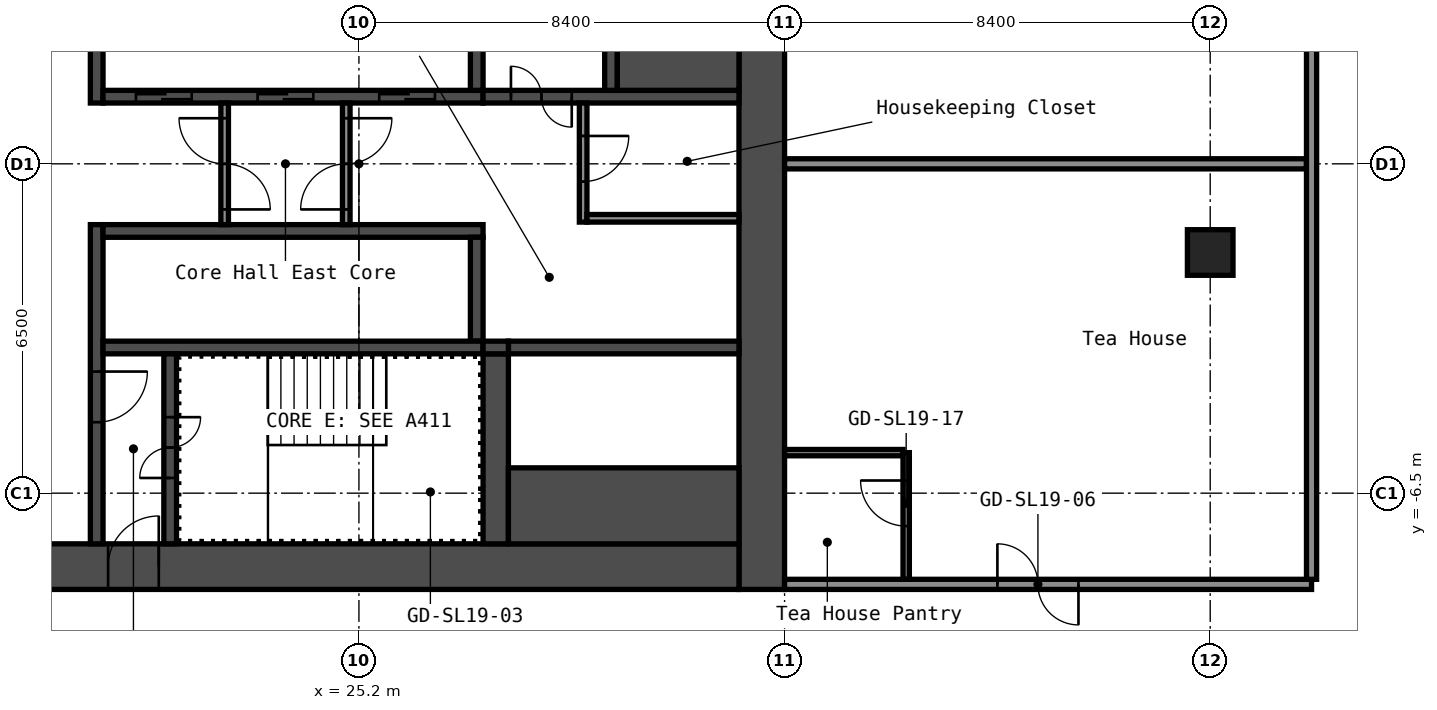
"""IFC4 building model, lengths in metres.
Left out: names, types, materials, properties, quantities, classifications, styles, units other than length and angle.
Written with IfcOpenShell. Run it as: python <this file> out.ifc"""

import sys

from ifc_helpers import new_model, si_unit, direction, frame, frame_2d, origin, origin_2d, place, context, subcontext, project, spatial, rectangle, hollow_rectangle, extrude, element, fill, save


model = new_model("IFC4")
c1 = context("Model", 3, precision=1e-05, world=origin(), true_north=direction((0.0, 1.0)))
c2 = subcontext(c1, "Body", "Model", "MODEL_VIEW")
j1 = project(units=[si_unit("LENGTHUNIT", "METRE"), si_unit("PLANEANGLEUNIT", "RADIAN")], contexts=[c1])
p1 = place(None, origin())
s1 = spatial("IfcSite", under=j1, at=p1, CompositionType="ELEMENT")
p2 = place(p1, origin())
s2 = spatial("IfcBuilding", under=s1, at=p2, CompositionType="ELEMENT")
p3 = place(p2, frame((0.0, 0.0, 69.0)))
s3 = spatial("IfcBuildingStorey", under=s2, at=p3, CompositionType="ELEMENT", Elevation=69.0)
p4 = place(p3, frame((42.0, -1.75, 0.0), z_axis=(0.0, 0.0, 1.0), x_axis=(1.0, 0.0, 0.0)))
e1 = element("IfcColumn", 1, at=p4, inside=s3, PredefinedType="COLUMN", context=c2, shape_type="SweptSolid", body=[
    extrude(hollow_rectangle(XDim=0.9, YDim=0.9, WallThickness=0.036, at=origin_2d()), origin(), (0.0, 0.0, 1.0), 6.0),
])
p5 = place(p3, frame((33.15, -8.4, 0.0), z_axis=(0.0, 0.0, 1.0), x_axis=(0.0, 1.0, 0.0)))
e2 = element("IfcWall", 2, at=p5, inside=s3, PredefinedType="SHEAR", context=c2, shape_type="SweptSolid", body=[
    extrude(rectangle(XDim=16.8, YDim=0.9, at=frame_2d((8.4, 0.0))), origin(), (0.0, 0.0, 1.0), 6.0),
])
p6 = place(p3, frame((17.7, -7.95, 0.0), z_axis=(0.0, 0.0, 1.0), x_axis=(1.0, 0.0, 0.0)))
e3 = element("IfcWall", 3, at=p6, inside=s3, PredefinedType="SHEAR", context=c2, shape_type="SweptSolid", body=[
    extrude(rectangle(XDim=15.0, YDim=0.9, at=frame_2d((7.5, 0.0))), origin(), (0.0, 0.0, 1.0), 6.0),
])
p7 = place(p6, frame((2.55, 0.0, 0.0)))
e4 = element("IfcOpeningElement", 4, at=p7, cuts=e3, PredefinedType="OPENING", context=c2, shape_type="SweptSolid", body=[
    extrude(rectangle(XDim=1.0, YDim=2.1, at=frame_2d((0.5, 1.05))), frame((0.0, 0.46, 0.0), z_axis=(0.0, -1.0, 0.0), x_axis=(1.0, 0.0, 0.0)), (0.0, 0.0, 1.0), 0.92),
])
p8 = place(p3, frame((20.025, 1.2, 0.0), z_axis=(0.0, 0.0, 1.0), x_axis=(0.0, 1.0, 0.0)))
e5 = element("IfcWall", 5, at=p8, inside=s3, PredefinedType="SHEAR", context=c2, shape_type="SweptSolid", body=[
    extrude(rectangle(XDim=6.3, YDim=0.25, at=frame_2d((3.15, 0.0))), origin(), (0.0, 0.0, 1.0), 6.0),
])
p9 = place(p3, frame((20.025, -7.5, 0.0), z_axis=(0.0, 0.0, 1.0), x_axis=(0.0, 1.0, 0.0)))
e6 = element("IfcWall", 6, at=p9, inside=s3, PredefinedType="SHEAR", context=c2, shape_type="SweptSolid", body=[
    extrude(rectangle(XDim=6.3, YDim=0.25, at=frame_2d((3.15, 0.0))), origin(), (0.0, 0.0, 1.0), 6.0),
])
p10 = place(p9, frame((2.4, 0.0, 0.0)))
e7 = element("IfcOpeningElement", 7, at=p10, cuts=e6, PredefinedType="OPENING", context=c2, shape_type="SweptSolid", body=[
    extrude(rectangle(XDim=1.0, YDim=2.1, at=frame_2d((0.5, 1.05))), frame((0.0, 0.135, 0.0), z_axis=(0.0, -1.0, 0.0), x_axis=(1.0, 0.0, 0.0)), (0.0, 0.0, 1.0), 0.27),
])
p11 = place(p3, frame((20.15, 1.325, 0.0), z_axis=(0.0, 0.0, 1.0), x_axis=(1.0, 0.0, 0.0)))
e8 = element("IfcWall", 8, at=p11, inside=s3, PredefinedType="SHEAR", context=c2, shape_type="SweptSolid", body=[
    extrude(rectangle(XDim=7.5, YDim=0.25, at=frame_2d((3.75, 0.0))), origin(), (0.0, 0.0, 1.0), 6.0),
])
p12 = place(p11, frame((0.65, 0.0, 0.0)))
e9 = element("IfcOpeningElement", 9, at=p12, cuts=e8, PredefinedType="OPENING", context=c2, shape_type="SweptSolid", body=[
    extrude(rectangle(XDim=1.1, YDim=2.1, at=frame_2d((0.55, 1.05))), frame((0.0, 0.135, 0.0), z_axis=(0.0, -1.0, 0.0), x_axis=(1.0, 0.0, 0.0)), (0.0, 0.0, 1.0), 0.27),
])
p13 = place(p11, frame((3.05, 0.0, 0.0)))
e10 = element("IfcOpeningElement", 10, at=p13, cuts=e8, PredefinedType="OPENING", context=c2, shape_type="SweptSolid", body=[
    extrude(rectangle(XDim=1.1, YDim=2.1, at=frame_2d((0.55, 1.05))), frame((0.0, 0.135, 0.0), z_axis=(0.0, -1.0, 0.0), x_axis=(1.0, 0.0, 0.0)), (0.0, 0.0, 1.0), 0.27),
])
p14 = place(p11, frame((5.45, 0.0, 0.0)))
e11 = element("IfcOpeningElement", 11, at=p14, cuts=e8, PredefinedType="OPENING", context=c2, shape_type="SweptSolid", body=[
    extrude(rectangle(XDim=1.1, YDim=2.1, at=frame_2d((0.55, 1.05))), frame((0.0, 0.135, 0.0), z_axis=(0.0, -1.0, 0.0), x_axis=(1.0, 0.0, 0.0)), (0.0, 0.0, 1.0), 0.27),
])
p15 = place(p3, frame((27.525, 1.45, 0.0), z_axis=(0.0, 0.0, 1.0), x_axis=(0.0, 1.0, 0.0)))
e12 = element("IfcWall", 12, at=p15, inside=s3, PredefinedType="SHEAR", context=c2, shape_type="SweptSolid", body=[
    extrude(rectangle(XDim=2.05, YDim=0.25, at=frame_2d((1.025, 0.0))), origin(), (0.0, 0.0, 1.0), 6.0),
])
p16 = place(p3, frame((27.65, 1.325, 0.0), z_axis=(0.0, 0.0, 1.0), x_axis=(1.0, 0.0, 0.0)))
e13 = element("IfcWall", 13, at=p16, inside=s3, PredefinedType="SHEAR", context=c2, shape_type="SweptSolid", body=[
    extrude(rectangle(XDim=5.05, YDim=0.25, at=frame_2d((2.525, 0.0))), origin(), (0.0, 0.0, 1.0), 6.0),
])
p17 = place(p16, frame((0.55, 0.0, 0.0)))
e14 = element("IfcOpeningElement", 14, at=p17, cuts=e13, PredefinedType="OPENING", context=c2, shape_type="SweptSolid", body=[
    extrude(rectangle(XDim=1.2, YDim=2.1, at=frame_2d((0.6, 1.05))), frame((0.0, 0.135, 0.0), z_axis=(0.0, -1.0, 0.0), x_axis=(1.0, 0.0, 0.0)), (0.0, 0.0, 1.0), 0.27),
])
p18 = place(p3, frame((30.175, 1.45, 0.0), z_axis=(0.0, 0.0, 1.0), x_axis=(0.0, 1.0, 0.0)))
e15 = element("IfcWall", 15, at=p18, inside=s3, PredefinedType="SHEAR", context=c2, shape_type="SweptSolid", body=[
    extrude(rectangle(XDim=6.05, YDim=0.25, at=frame_2d((3.025, 0.0))), origin(), (0.0, 0.0, 1.0), 6.0),
])
p19 = place(p18, frame((2.625, 0.0, 0.0)))
e16 = element("IfcOpeningElement", 16, at=p19, cuts=e15, PredefinedType="OPENING", context=c2, shape_type="SweptSolid", body=[
    extrude(rectangle(XDim=1.1, YDim=2.1, at=frame_2d((0.55, 1.05))), frame((0.0, 0.135, 0.0), z_axis=(0.0, -1.0, 0.0), x_axis=(1.0, 0.0, 0.0)), (0.0, 0.0, 1.0), 0.27),
])
p20 = place(p3, frame((30.3, 2.375, 0.0), z_axis=(0.0, 0.0, 1.0), x_axis=(1.0, 0.0, 0.0)))
e17 = element("IfcWall", 17, at=p20, inside=s3, PredefinedType="SHEAR", context=c2, shape_type="SweptSolid", body=[
    extrude(rectangle(XDim=2.4, YDim=1.85, at=frame_2d((1.2, 0.0))), origin(), (0.0, 0.0, 1.0), 6.0),
])
p21 = place(p3, frame((20.15, -1.325, 0.0), z_axis=(0.0, 0.0, 1.0), x_axis=(1.0, 0.0, 0.0)))
e18 = element("IfcWall", 18, at=p21, inside=s3, PredefinedType="SHEAR", context=c2, shape_type="SweptSolid", body=[
    extrude(rectangle(XDim=7.5, YDim=0.25, at=frame_2d((3.75, 0.0))), origin(), (0.0, 0.0, 1.0), 6.0),
])
p22 = place(p3, frame((27.525, -3.5, 0.0), z_axis=(0.0, 0.0, 1.0), x_axis=(0.0, 1.0, 0.0)))
e19 = element("IfcWall", 19, at=p22, inside=s3, PredefinedType="SHEAR", context=c2, shape_type="SweptSolid", body=[
    extrude(rectangle(XDim=2.05, YDim=0.25, at=frame_2d((1.025, 0.0))), origin(), (0.0, 0.0, 1.0), 6.0),
])
p23 = place(p3, frame((20.15, -3.625, 0.0), z_axis=(0.0, 0.0, 1.0), x_axis=(1.0, 0.0, 0.0)))
e20 = element("IfcWall", 20, at=p23, inside=s3, PredefinedType="SHEAR", context=c2, shape_type="SweptSolid", body=[
    extrude(rectangle(XDim=7.5, YDim=0.25, at=frame_2d((3.75, 0.0))), origin(), (0.0, 0.0, 1.0), 6.0),
])
p24 = place(p3, frame((21.475, -7.5, 0.0), z_axis=(0.0, 0.0, 1.0), x_axis=(0.0, 1.0, 0.0)))
e21 = element("IfcWall", 21, at=p24, inside=s3, PredefinedType="SHEAR", context=c2, shape_type="SweptSolid", body=[
    extrude(rectangle(XDim=3.75, YDim=0.25, at=frame_2d((1.875, 0.0))), origin(), (0.0, 0.0, 1.0), 6.0),
])
p25 = place(p24, frame((1.3, 0.0, 0.0)))
e22 = element("IfcOpeningElement", 22, at=p25, cuts=e21, PredefinedType="OPENING", context=c2, shape_type="SweptSolid", body=[
    extrude(rectangle(XDim=1.2, YDim=2.1, at=frame_2d((0.6, 1.05))), frame((0.0, 0.135, 0.0), z_axis=(0.0, -1.0, 0.0), x_axis=(1.0, 0.0, 0.0)), (0.0, 0.0, 1.0), 0.27),
])
p26 = place(p3, frame((27.9, -7.5, 0.0), z_axis=(0.0, 0.0, 1.0), x_axis=(0.0, 1.0, 0.0)))
e23 = element("IfcWall", 23, at=p26, inside=s3, PredefinedType="SHEAR", context=c2, shape_type="SweptSolid", body=[
    extrude(rectangle(XDim=3.75, YDim=0.5, at=frame_2d((1.875, 0.0))), origin(), (0.0, 0.0, 1.0), 6.0),
])
p27 = place(p3, frame((28.15, -3.625, 0.0), z_axis=(0.0, 0.0, 1.0), x_axis=(1.0, 0.0, 0.0)))
e24 = element("IfcWall", 24, at=p27, inside=s3, PredefinedType="SHEAR", context=c2, shape_type="SweptSolid", body=[
    extrude(rectangle(XDim=4.55, YDim=0.25, at=frame_2d((2.275, 0.0))), origin(), (0.0, 0.0, 1.0), 6.0),
])
p28 = place(p3, frame((28.15, -6.75, 0.0), z_axis=(0.0, 0.0, 1.0), x_axis=(1.0, 0.0, 0.0)))
e25 = element("IfcWall", 25, at=p28, inside=s3, PredefinedType="SHEAR", context=c2, shape_type="SweptSolid", body=[
    extrude(rectangle(XDim=4.55, YDim=1.5, at=frame_2d((2.275, 0.0))), origin(), (0.0, 0.0, 1.0), 6.0),
])
p29 = place(p3, frame((27.65, -3.625, 0.0), z_axis=(0.0, 0.0, 1.0), x_axis=(1.0, 0.0, 0.0)))
e26 = element("IfcWall", 26, at=p29, inside=s3, PredefinedType="SHEAR", context=c2, shape_type="SweptSolid", body=[
    extrude(rectangle(XDim=0.5, YDim=0.25, at=frame_2d((0.25, 0.0))), origin(), (0.0, 0.0, 1.0), 6.0),
])
p30 = place(p3, frame((22.55, -1.2, 0.0), z_axis=(0.0, 0.0, 1.0), x_axis=(0.0, 1.0, 0.0)))
e27 = element("IfcWall", 27, at=p30, inside=s3, PredefinedType="PARTITIONING", context=c2, shape_type="SweptSolid", body=[
    extrude(rectangle(XDim=2.4, YDim=0.15, at=frame_2d((1.2, 0.0))), origin(), (0.0, 0.0, 1.0), 6.0),
])
p31 = place(p30, frame((0.3, 0.0, 0.0)))
e28 = element("IfcOpeningElement", 28, at=p31, cuts=e27, PredefinedType="OPENING", context=c2, shape_type="SweptSolid", body=[
    extrude(rectangle(XDim=1.8, YDim=2.1, at=frame_2d((0.9, 1.05))), frame((0.0, 0.085, 0.0), z_axis=(0.0, -1.0, 0.0), x_axis=(1.0, 0.0, 0.0)), (0.0, 0.0, 1.0), 0.17),
])
p32 = place(p3, frame((24.95, -1.2, 0.0), z_axis=(0.0, 0.0, 1.0), x_axis=(0.0, 1.0, 0.0)))
e29 = element("IfcWall", 29, at=p32, inside=s3, PredefinedType="PARTITIONING", context=c2, shape_type="SweptSolid", body=[
    extrude(rectangle(XDim=2.4, YDim=0.15, at=frame_2d((1.2, 0.0))), origin(), (0.0, 0.0, 1.0), 6.0),
])
p33 = place(p32, frame((0.3, 0.0, 0.0)))
e30 = element("IfcOpeningElement", 30, at=p33, cuts=e29, PredefinedType="OPENING", context=c2, shape_type="SweptSolid", body=[
    extrude(rectangle(XDim=1.8, YDim=2.1, at=frame_2d((0.9, 1.05))), frame((0.0, 0.085, 0.0), z_axis=(0.0, -1.0, 0.0), x_axis=(1.0, 0.0, 0.0)), (0.0, 0.0, 1.0), 0.17),
])
p34 = place(p3, frame((29.625, -1.15, 0.0), z_axis=(0.0, 0.0, 1.0), x_axis=(0.0, 1.0, 0.0)))
e31 = element("IfcWall", 31, at=p34, inside=s3, PredefinedType="PARTITIONING", context=c2, shape_type="SweptSolid", body=[
    extrude(rectangle(XDim=2.35, YDim=0.15, at=frame_2d((1.175, 0.0))), origin(), (0.0, 0.0, 1.0), 6.0),
])
p35 = place(p34, frame((0.8, 0.0, 0.0)))
e32 = element("IfcOpeningElement", 32, at=p35, cuts=e31, PredefinedType="OPENING", context=c2, shape_type="SweptSolid", body=[
    extrude(rectangle(XDim=0.9, YDim=2.1, at=frame_2d((0.45, 1.05))), frame((0.0, 0.085, 0.0), z_axis=(0.0, -1.0, 0.0), x_axis=(1.0, 0.0, 0.0)), (0.0, 0.0, 1.0), 0.17),
])
p36 = place(p3, frame((29.7, -1.075, 0.0), z_axis=(0.0, 0.0, 1.0), x_axis=(1.0, 0.0, 0.0)))
e33 = element("IfcWall", 33, at=p36, inside=s3, PredefinedType="PARTITIONING", context=c2, shape_type="SweptSolid", body=[
    extrude(rectangle(XDim=3.0, YDim=0.15, at=frame_2d((1.5, 0.0))), origin(), (0.0, 0.0, 1.0), 6.0),
])
p37 = place(p3, frame((33.6, -8.3, 0.0), z_axis=(0.0, 0.0, 1.0), x_axis=(1.0, 0.0, 0.0)))
e34 = element("IfcWall", 34, at=p37, inside=s3, PredefinedType="PARTITIONING", context=c2, shape_type="SweptSolid", body=[
    extrude(rectangle(XDim=10.4, YDim=0.2, at=frame_2d((5.2, 0.0))), origin(), (0.0, 0.0, 1.0), 6.0),
])
p38 = place(p37, frame((4.2, 0.0, 0.0)))
e35 = element("IfcOpeningElement", 35, at=p38, cuts=e34, PredefinedType="OPENING", context=c2, shape_type="SweptSolid", body=[
    extrude(rectangle(XDim=1.6, YDim=2.1, at=frame_2d((0.8, 1.05))), frame((0.0, 0.11, 0.0), z_axis=(0.0, -1.0, 0.0), x_axis=(1.0, 0.0, 0.0)), (0.0, 0.0, 1.0), 0.22),
])
p39 = place(p3, frame((33.6, -5.7, 0.0), z_axis=(0.0, 0.0, 1.0), x_axis=(1.0, 0.0, 0.0)))
e36 = element("IfcWall", 36, at=p39, inside=s3, PredefinedType="PARTITIONING", context=c2, shape_type="SweptSolid", body=[
    extrude(rectangle(XDim=2.337, YDim=0.125, at=frame_2d((1.169, 0.0))), origin(), (0.0, 0.0, 1.0), 6.0),
])
p40 = place(p3, frame((33.6, 0.0, 0.0), z_axis=(0.0, 0.0, 1.0), x_axis=(1.0, 0.0, 0.0)))
e37 = element("IfcWall", 37, at=p40, inside=s3, PredefinedType="PARTITIONING", context=c2, shape_type="SweptSolid", body=[
    extrude(rectangle(XDim=10.3, YDim=0.2, at=frame_2d((5.15, 0.0))), origin(), (0.0, 0.0, 1.0), 6.0),
])
p41 = place(p3, frame((36.0, -8.2, 0.0), z_axis=(0.0, 0.0, 1.0), x_axis=(0.0, 1.0, 0.0)))
e38 = element("IfcWall", 38, at=p41, inside=s3, PredefinedType="PARTITIONING", context=c2, shape_type="SweptSolid", body=[
    extrude(rectangle(XDim=2.5, YDim=0.125, at=frame_2d((1.25, 0.0))), origin(), (0.0, 0.0, 1.0), 6.0),
])
p42 = place(p41, frame((1.05, 0.0, 0.0)))
e39 = element("IfcOpeningElement", 39, at=p42, cuts=e38, PredefinedType="OPENING", context=c2, shape_type="SweptSolid", body=[
    extrude(rectangle(XDim=0.9, YDim=2.1, at=frame_2d((0.45, 1.05))), frame((0.0, 0.073, 0.0), z_axis=(0.0, -1.0, 0.0), x_axis=(1.0, 0.0, 0.0)), (0.0, 0.0, 1.0), 0.145),
])
p43 = place(p3, frame((44.0, -8.2, 0.0), z_axis=(0.0, 0.0, 1.0), x_axis=(0.0, 1.0, 0.0)))
e40 = element("IfcWall", 40, at=p43, inside=s3, PredefinedType="PARTITIONING", context=c2, shape_type="SweptSolid", body=[
    extrude(rectangle(XDim=16.4, YDim=0.2, at=frame_2d((8.2, 0.0))), origin(), (0.0, 0.0, 1.0), 6.0),
])
p44 = place(p7, origin())
e41 = element("IfcDoor", 41, at=p44, inside=s3, OperationType="SINGLE_SWING_LEFT", PredefinedType="DOOR", context=c2, shape_type="SweptSolid", body=[
    extrude(rectangle(XDim=1.0, YDim=2.1, at=frame_2d((0.5, 1.05))), frame((0.0, 0.025, 0.0), z_axis=(0.0, -1.0, 0.0), x_axis=(1.0, 0.0, 0.0)), (0.0, 0.0, 1.0), 0.05),
])
fill(e4, e41)
p45 = place(p25, origin())
e42 = element("IfcDoor", 42, at=p45, inside=s3, OperationType="DOUBLE_DOOR_SINGLE_SWING", PredefinedType="DOOR", context=c2, shape_type="SweptSolid", body=[
    extrude(rectangle(XDim=1.2, YDim=2.1, at=frame_2d((0.6, 1.05))), frame((0.0, 0.025, 0.0), z_axis=(0.0, -1.0, 0.0), x_axis=(1.0, 0.0, 0.0)), (0.0, 0.0, 1.0), 0.05),
])
fill(e22, e42)
p46 = place(p10, origin())
e43 = element("IfcDoor", 43, at=p46, inside=s3, OperationType="SINGLE_SWING_RIGHT", PredefinedType="DOOR", context=c2, shape_type="SweptSolid", body=[
    extrude(rectangle(XDim=1.0, YDim=2.1, at=frame_2d((0.5, 1.05))), frame((0.0, 0.025, 0.0), z_axis=(0.0, -1.0, 0.0), x_axis=(1.0, 0.0, 0.0)), (0.0, 0.0, 1.0), 0.05),
])
fill(e7, e43)
p47 = place(p17, origin())
e44 = element("IfcDoor", 44, at=p47, inside=s3, OperationType="DOUBLE_DOOR_SINGLE_SWING", PredefinedType="DOOR", context=c2, shape_type="SweptSolid", body=[
    extrude(rectangle(XDim=1.2, YDim=2.1, at=frame_2d((0.6, 1.05))), frame((0.0, 0.025, 0.0), z_axis=(0.0, -1.0, 0.0), x_axis=(1.0, 0.0, 0.0)), (0.0, 0.0, 1.0), 0.05),
])
fill(e14, e44)
p48 = place(p31, origin())
e45 = element("IfcDoor", 45, at=p48, inside=s3, OperationType="DOUBLE_DOOR_SINGLE_SWING", PredefinedType="DOOR", context=c2, shape_type="SweptSolid", body=[
    extrude(rectangle(XDim=1.8, YDim=2.1, at=frame_2d((0.9, 1.05))), frame((0.0, 0.025, 0.0), z_axis=(0.0, -1.0, 0.0), x_axis=(1.0, 0.0, 0.0)), (0.0, 0.0, 1.0), 0.05),
])
fill(e28, e45)
p49 = place(p33, origin())
e46 = element("IfcDoor", 46, at=p49, inside=s3, OperationType="DOUBLE_DOOR_SINGLE_SWING", PredefinedType="DOOR", context=c2, shape_type="SweptSolid", body=[
    extrude(rectangle(XDim=1.8, YDim=2.1, at=frame_2d((0.9, 1.05))), frame((0.0, 0.025, 0.0), z_axis=(0.0, -1.0, 0.0), x_axis=(1.0, 0.0, 0.0)), (0.0, 0.0, 1.0), 0.05),
])
fill(e30, e46)
p50 = place(p35, origin())
e47 = element("IfcDoor", 47, at=p50, inside=s3, OperationType="SINGLE_SWING_RIGHT", PredefinedType="DOOR", context=c2, shape_type="SweptSolid", body=[
    extrude(rectangle(XDim=0.9, YDim=2.1, at=frame_2d((0.45, 1.05))), frame((0.0, 0.025, 0.0), z_axis=(0.0, -1.0, 0.0), x_axis=(1.0, 0.0, 0.0)), (0.0, 0.0, 1.0), 0.05),
])
fill(e32, e47)
p51 = place(p12, origin())
e48 = element("IfcDoor", 48, at=p51, inside=s3, OperationType="DOUBLE_DOOR_SLIDING", PredefinedType="DOOR", context=c2, shape_type="SweptSolid", body=[
    extrude(rectangle(XDim=1.1, YDim=2.1, at=frame_2d((0.55, 1.05))), frame((0.0, 0.025, 0.0), z_axis=(0.0, -1.0, 0.0), x_axis=(1.0, 0.0, 0.0)), (0.0, 0.0, 1.0), 0.05),
])
fill(e9, e48)
p52 = place(p13, origin())
e49 = element("IfcDoor", 49, at=p52, inside=s3, OperationType="DOUBLE_DOOR_SLIDING", PredefinedType="DOOR", context=c2, shape_type="SweptSolid", body=[
    extrude(rectangle(XDim=1.1, YDim=2.1, at=frame_2d((0.55, 1.05))), frame((0.0, 0.025, 0.0), z_axis=(0.0, -1.0, 0.0), x_axis=(1.0, 0.0, 0.0)), (0.0, 0.0, 1.0), 0.05),
])
fill(e10, e49)
p53 = place(p14, origin())
e50 = element("IfcDoor", 50, at=p53, inside=s3, OperationType="DOUBLE_DOOR_SLIDING", PredefinedType="DOOR", context=c2, shape_type="SweptSolid", body=[
    extrude(rectangle(XDim=1.1, YDim=2.1, at=frame_2d((0.55, 1.05))), frame((0.0, 0.025, 0.0), z_axis=(0.0, -1.0, 0.0), x_axis=(1.0, 0.0, 0.0)), (0.0, 0.0, 1.0), 0.05),
])
fill(e11, e50)
p54 = place(p38, origin())
e51 = element("IfcDoor", 51, at=p54, inside=s3, OperationType="DOUBLE_DOOR_SINGLE_SWING", PredefinedType="DOOR", context=c2, shape_type="SweptSolid", body=[
    extrude(rectangle(XDim=1.6, YDim=2.1, at=frame_2d((0.8, 1.05))), frame((0.0, 0.025, 0.0), z_axis=(0.0, -1.0, 0.0), x_axis=(1.0, 0.0, 0.0)), (0.0, 0.0, 1.0), 0.05),
])
fill(e35, e51)
p55 = place(p42, origin())
e52 = element("IfcDoor", 52, at=p55, inside=s3, OperationType="SINGLE_SWING_LEFT", PredefinedType="DOOR", context=c2, shape_type="SweptSolid", body=[
    extrude(rectangle(XDim=0.9, YDim=2.1, at=frame_2d((0.45, 1.05))), frame((0.0, 0.025, 0.0), z_axis=(0.0, -1.0, 0.0), x_axis=(1.0, 0.0, 0.0)), (0.0, 0.0, 1.0), 0.05),
])
fill(e39, e52)
save(model, sys.argv[1])
